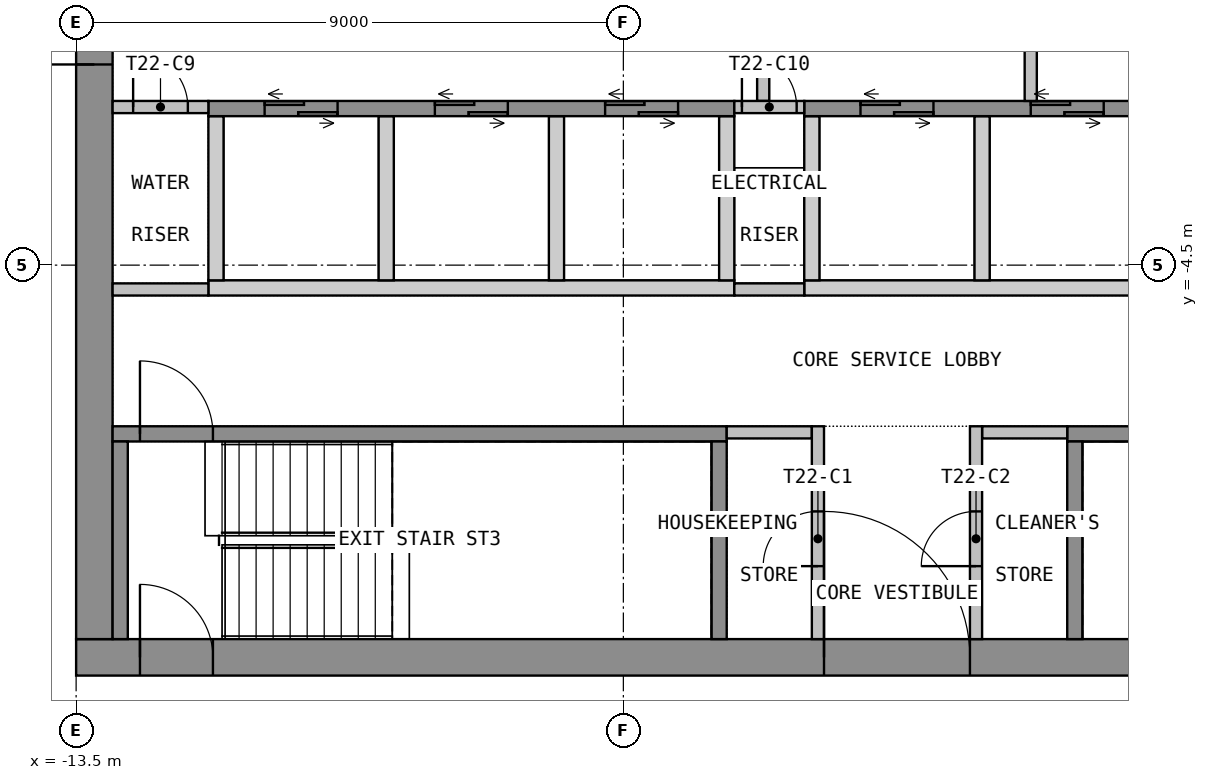
"""IFC4 building model, lengths in metres.
Left out: names, types, materials, properties, quantities, classifications, styles, units other than length and angle.
Written with IfcOpenShell. Run it as: python <this file> out.ifc"""

import sys

from ifc_helpers import new_model, si_unit, direction, frame, frame_2d, origin, place, context, subcontext, project, spatial, polyline, rectangle, outline, extrude, element, fill, save


model = new_model("IFC4")
c1 = context("Model", 3, precision=1e-05, world=origin(), true_north=direction((0.0, 1.0)))
c2 = subcontext(c1, "Body", "Model", "MODEL_VIEW")
j1 = project(units=[si_unit("LENGTHUNIT", "METRE"), si_unit("PLANEANGLEUNIT", "RADIAN")], contexts=[c1])
p1 = place(None, origin())
s1 = spatial("IfcSite", under=j1, at=p1, CompositionType="ELEMENT")
p2 = place(p1, origin())
s2 = spatial("IfcBuilding", under=s1, at=p2, CompositionType="ELEMENT")
p3 = place(p2, frame((0.0, 0.0, 298.2)))
s3 = spatial("IfcBuildingStorey", under=s2, at=p3, CompositionType="ELEMENT", Elevation=298.2)
p4 = place(p3, frame((-13.5, -10.95, 0.0), z_axis=(0.0, 0.0, 1.0), x_axis=(1.0, 0.0, 0.0)))
e1 = element("IfcWall", 1, at=p4, inside=s3, PredefinedType="SHEAR", context=c2, shape_type="SweptSolid", body=[
    extrude(rectangle(XDim=27.0, YDim=0.6, at=frame_2d((13.5, 0.0))), origin(), (0.0, 0.0, 1.0), 3.575),
])
p5 = place(p4, frame((12.3, 0.0, 0.0)))
e2 = element("IfcOpeningElement", 2, at=p5, cuts=e1, PredefinedType="OPENING", context=c2, shape_type="SweptSolid", body=[
    extrude(rectangle(XDim=2.4, YDim=2.1, at=frame_2d((1.2, 1.05))), frame((0.0, 0.31, 0.0), z_axis=(0.0, -1.0, 0.0), x_axis=(1.0, 0.0, 0.0)), (0.0, 0.0, 1.0), 0.62),
])
p6 = place(p4, frame((1.05, 0.0, 0.0)))
e3 = element("IfcOpeningElement", 3, at=p6, cuts=e1, PredefinedType="OPENING", context=c2, shape_type="SweptSolid", body=[
    extrude(rectangle(XDim=1.2, YDim=2.1, at=frame_2d((0.6, 1.05))), frame((0.0, 0.31, 0.0), z_axis=(0.0, -1.0, 0.0), x_axis=(1.0, 0.0, 0.0)), (0.0, 0.0, 1.0), 0.62),
])
p7 = place(p4, frame((24.75, 0.0, 0.0)))
e4 = element("IfcOpeningElement", 4, at=p7, cuts=e1, PredefinedType="OPENING", context=c2, shape_type="SweptSolid", body=[
    extrude(rectangle(XDim=1.2, YDim=2.1, at=frame_2d((0.6, 1.05))), frame((0.0, 0.31, 0.0), z_axis=(0.0, -1.0, 0.0), x_axis=(1.0, 0.0, 0.0)), (0.0, 0.0, 1.0), 0.62),
])
p8 = place(p3, frame((-13.2, -10.65, 0.0), z_axis=(0.0, 0.0, 1.0), x_axis=(0.0, 1.0, 0.0)))
e5 = element("IfcWall", 5, at=p8, inside=s3, PredefinedType="SHEAR", context=c2, shape_type="SweptSolid", body=[
    extrude(rectangle(XDim=21.3, YDim=0.6, at=frame_2d((10.65, 0.0))), origin(), (0.0, 0.0, 1.0), 3.575),
])
p9 = place(p8, frame((9.45, 0.0, 0.0)))
e6 = element("IfcOpeningElement", 6, at=p9, cuts=e5, PredefinedType="OPENING", context=c2, shape_type="SweptSolid", body=[
    extrude(rectangle(XDim=2.4, YDim=2.1, at=frame_2d((1.2, 1.05))), frame((0.0, 0.31, 0.0), z_axis=(0.0, -1.0, 0.0), x_axis=(1.0, 0.0, 0.0)), (0.0, 0.0, 1.0), 0.62),
])
p10 = place(p3, origin())
e7 = element("IfcWall", 7, at=p10, inside=s3, PredefinedType="SHEAR", context=c2, shape_type="SweptSolid", body=[
    extrude(outline(polyline([(-11.325, -5.0), (-2.675, -5.0), (-2.675, -4.75), (-11.325, -4.75), (-11.325, -5.0)])), origin(), (0.0, 0.0, 1.0), 3.575),
])
p11 = place(p3, origin())
e8 = element("IfcWall", 8, at=p11, inside=s3, PredefinedType="SHEAR", context=c2, shape_type="SweptSolid", body=[
    extrude(outline(polyline([(-1.525, -5.0), (4.325, -5.0), (4.325, -4.75), (-1.525, -4.75), (-1.525, -5.0)])), origin(), (0.0, 0.0, 1.0), 3.575),
])
p12 = place(p3, origin())
e9 = element("IfcWall", 9, at=p12, inside=s3, PredefinedType="SHEAR", context=c2, shape_type="SweptSolid", body=[
    extrude(outline(polyline([(-11.325, -4.75), (-11.075, -4.75), (-11.075, -2.05), (-11.325, -2.05), (-11.325, -4.75)])), origin(), (0.0, 0.0, 1.0), 3.575),
])
p13 = place(p3, origin())
e10 = element("IfcWall", 10, at=p13, inside=s3, PredefinedType="SHEAR", context=c2, shape_type="SweptSolid", body=[
    extrude(outline(polyline([(-8.525, -4.75), (-8.275, -4.75), (-8.275, -2.05), (-8.525, -2.05), (-8.525, -4.75)])), origin(), (0.0, 0.0, 1.0), 3.575),
])
p14 = place(p3, origin())
e11 = element("IfcWall", 11, at=p14, inside=s3, PredefinedType="SHEAR", context=c2, shape_type="SweptSolid", body=[
    extrude(outline(polyline([(-5.725, -4.75), (-5.475, -4.75), (-5.475, -2.05), (-5.725, -2.05), (-5.725, -4.75)])), origin(), (0.0, 0.0, 1.0), 3.575),
])
p15 = place(p3, origin())
e12 = element("IfcWall", 12, at=p15, inside=s3, PredefinedType="SHEAR", context=c2, shape_type="SweptSolid", body=[
    extrude(outline(polyline([(-2.925, -4.75), (-2.675, -4.75), (-2.675, -2.05), (-2.925, -2.05), (-2.925, -4.75)])), origin(), (0.0, 0.0, 1.0), 3.575),
])
p16 = place(p3, origin())
e13 = element("IfcWall", 13, at=p16, inside=s3, PredefinedType="SHEAR", context=c2, shape_type="SweptSolid", body=[
    extrude(outline(polyline([(-1.525, -4.75), (-1.275, -4.75), (-1.275, -2.05), (-1.525, -2.05), (-1.525, -4.75)])), origin(), (0.0, 0.0, 1.0), 3.575),
])
p17 = place(p3, origin())
e14 = element("IfcWall", 14, at=p17, inside=s3, PredefinedType="SHEAR", context=c2, shape_type="SweptSolid", body=[
    extrude(outline(polyline([(1.275, -4.75), (1.525, -4.75), (1.525, -2.05), (1.275, -2.05), (1.275, -4.75)])), origin(), (0.0, 0.0, 1.0), 3.575),
])
p18 = place(p3, frame((-11.325, -1.925, 0.0), z_axis=(0.0, 0.0, 1.0), x_axis=(1.0, 0.0, 0.0)))
e15 = element("IfcWall", 15, at=p18, inside=s3, PredefinedType="SHEAR", context=c2, shape_type="SweptSolid", body=[
    extrude(rectangle(XDim=8.65, YDim=0.25, at=frame_2d((4.325, 0.0))), origin(), (0.0, 0.0, 1.0), 3.575),
])
p19 = place(p18, frame((0.925, 0.0, 0.0)))
e16 = element("IfcOpeningElement", 16, at=p19, cuts=e15, PredefinedType="OPENING", context=c2, shape_type="SweptSolid", body=[
    extrude(rectangle(XDim=1.2, YDim=2.1, at=frame_2d((0.6, 1.05))), frame((0.0, 0.135, 0.0), z_axis=(0.0, -1.0, 0.0), x_axis=(1.0, 0.0, 0.0)), (0.0, 0.0, 1.0), 0.27),
])
p20 = place(p18, frame((3.725, 0.0, 0.0)))
e17 = element("IfcOpeningElement", 17, at=p20, cuts=e15, PredefinedType="OPENING", context=c2, shape_type="SweptSolid", body=[
    extrude(rectangle(XDim=1.2, YDim=2.1, at=frame_2d((0.6, 1.05))), frame((0.0, 0.135, 0.0), z_axis=(0.0, -1.0, 0.0), x_axis=(1.0, 0.0, 0.0)), (0.0, 0.0, 1.0), 0.27),
])
p21 = place(p18, frame((6.525, 0.0, 0.0)))
e18 = element("IfcOpeningElement", 18, at=p21, cuts=e15, PredefinedType="OPENING", context=c2, shape_type="SweptSolid", body=[
    extrude(rectangle(XDim=1.2, YDim=2.1, at=frame_2d((0.6, 1.05))), frame((0.0, 0.135, 0.0), z_axis=(0.0, -1.0, 0.0), x_axis=(1.0, 0.0, 0.0)), (0.0, 0.0, 1.0), 0.27),
])
p22 = place(p3, frame((-1.525, -1.925, 0.0), z_axis=(0.0, 0.0, 1.0), x_axis=(1.0, 0.0, 0.0)))
e19 = element("IfcWall", 19, at=p22, inside=s3, PredefinedType="SHEAR", context=c2, shape_type="SweptSolid", body=[
    extrude(rectangle(XDim=5.85, YDim=0.25, at=frame_2d((2.925, 0.0))), origin(), (0.0, 0.0, 1.0), 3.575),
])
p23 = place(p22, frame((0.925, 0.0, 0.0)))
e20 = element("IfcOpeningElement", 20, at=p23, cuts=e19, PredefinedType="OPENING", context=c2, shape_type="SweptSolid", body=[
    extrude(rectangle(XDim=1.2, YDim=2.1, at=frame_2d((0.6, 1.05))), frame((0.0, 0.135, 0.0), z_axis=(0.0, -1.0, 0.0), x_axis=(1.0, 0.0, 0.0)), (0.0, 0.0, 1.0), 0.27),
])
p24 = place(p22, frame((3.725, 0.0, 0.0)))
e21 = element("IfcOpeningElement", 21, at=p24, cuts=e19, PredefinedType="OPENING", context=c2, shape_type="SweptSolid", body=[
    extrude(rectangle(XDim=1.2, YDim=2.1, at=frame_2d((0.6, 1.05))), frame((0.0, 0.135, 0.0), z_axis=(0.0, -1.0, 0.0), x_axis=(1.0, 0.0, 0.0)), (0.0, 0.0, 1.0), 0.27),
])
p25 = place(p3, frame((-2.2, -1.8, 0.0), z_axis=(0.0, 0.0, 1.0), x_axis=(0.0, 1.0, 0.0)))
e22 = element("IfcWall", 22, at=p25, inside=s3, PredefinedType="PARTITIONING", context=c2, shape_type="SweptSolid", body=[
    extrude(rectangle(XDim=3.6, YDim=0.2, at=frame_2d((1.8, 0.0))), origin(), (0.0, 0.0, 1.0), 3.575),
])
p26 = place(p25, frame((1.2, 0.0, 0.0)))
e23 = element("IfcOpeningElement", 23, at=p26, cuts=e22, PredefinedType="OPENING", context=c2, shape_type="SweptSolid", body=[
    extrude(rectangle(XDim=1.2, YDim=2.1, at=frame_2d((0.6, 1.05))), frame((0.0, 0.11, 0.0), z_axis=(0.0, -1.0, 0.0), x_axis=(1.0, 0.0, 0.0)), (0.0, 0.0, 1.0), 0.22),
])
p27 = place(p3, frame((2.2, -1.8, 0.0), z_axis=(0.0, 0.0, 1.0), x_axis=(0.0, 1.0, 0.0)))
e24 = element("IfcWall", 24, at=p27, inside=s3, PredefinedType="PARTITIONING", context=c2, shape_type="SweptSolid", body=[
    extrude(rectangle(XDim=3.6, YDim=0.2, at=frame_2d((1.8, 0.0))), origin(), (0.0, 0.0, 1.0), 3.575),
])
p28 = place(p27, frame((1.2, 0.0, 0.0)))
e25 = element("IfcOpeningElement", 25, at=p28, cuts=e24, PredefinedType="OPENING", context=c2, shape_type="SweptSolid", body=[
    extrude(rectangle(XDim=1.2, YDim=2.1, at=frame_2d((0.6, 1.05))), frame((0.0, 0.11, 0.0), z_axis=(0.0, -1.0, 0.0), x_axis=(1.0, 0.0, 0.0)), (0.0, 0.0, 1.0), 0.22),
])
p29 = place(p3, frame((-12.9, -7.275, 0.0), z_axis=(0.0, 0.0, 1.0), x_axis=(1.0, 0.0, 0.0)))
e26 = element("IfcWall", 26, at=p29, inside=s3, PredefinedType="SHEAR", context=c2, shape_type="SweptSolid", body=[
    extrude(rectangle(XDim=10.1, YDim=0.25, at=frame_2d((5.05, 0.0))), origin(), (0.0, 0.0, 1.0), 3.575),
])
p30 = place(p29, frame((0.45, 0.0, 0.0)))
e27 = element("IfcOpeningElement", 27, at=p30, cuts=e26, PredefinedType="OPENING", context=c2, shape_type="SweptSolid", body=[
    extrude(rectangle(XDim=1.2, YDim=2.1, at=frame_2d((0.6, 1.05))), frame((0.0, 0.135, 0.0), z_axis=(0.0, -1.0, 0.0), x_axis=(1.0, 0.0, 0.0)), (0.0, 0.0, 1.0), 0.27),
])
for number, where, z_axis, x_axis in (
    (28, (-12.775, -10.65, 0.0), (0.0, 0.0, 1.0), (0.0, 1.0, 0.0)),
    (29, (-2.925, -10.65, 0.0), (0.0, 0.0, 1.0), (0.0, 1.0, 0.0)),
):
    element("IfcWall", number, at=place(p3, frame(where, z_axis=z_axis, x_axis=x_axis)), inside=s3, PredefinedType="SHEAR", context=c2, shape_type="SweptSolid", body=[
        extrude(rectangle(XDim=3.25, YDim=0.25, at=frame_2d((1.625, 0.0))), origin(), (0.0, 0.0, 1.0), 3.575),
    ])
p31 = place(p3, frame((2.8, -7.275, 0.0), z_axis=(0.0, 0.0, 1.0), x_axis=(1.0, 0.0, 0.0)))
e30 = element("IfcWall", 30, at=p31, inside=s3, PredefinedType="SHEAR", context=c2, shape_type="SweptSolid", body=[
    extrude(rectangle(XDim=10.1, YDim=0.25, at=frame_2d((5.05, 0.0))), origin(), (0.0, 0.0, 1.0), 3.575),
])
p32 = place(p31, frame((8.45, 0.0, 0.0)))
e31 = element("IfcOpeningElement", 31, at=p32, cuts=e30, PredefinedType="OPENING", context=c2, shape_type="SweptSolid", body=[
    extrude(rectangle(XDim=1.2, YDim=2.1, at=frame_2d((0.6, 1.05))), frame((0.0, 0.135, 0.0), z_axis=(0.0, -1.0, 0.0), x_axis=(1.0, 0.0, 0.0)), (0.0, 0.0, 1.0), 0.27),
])
p33 = place(p3, frame((2.925, -10.65, 0.0), z_axis=(0.0, 0.0, 1.0), x_axis=(0.0, 1.0, 0.0)))
e32 = element("IfcWall", 32, at=p33, inside=s3, PredefinedType="SHEAR", context=c2, shape_type="SweptSolid", body=[
    extrude(rectangle(XDim=3.25, YDim=0.25, at=frame_2d((1.625, 0.0))), origin(), (0.0, 0.0, 1.0), 3.575),
])
for number, where, z_axis, x_axis in (
    (33, (-2.8, -7.25, 0.0), (0.0, 0.0, 1.0), (1.0, 0.0, 0.0)),
    (34, (1.4, -7.25, 0.0), (0.0, 0.0, 1.0), (1.0, 0.0, 0.0)),
):
    element("IfcWall", number, at=place(p3, frame(where, z_axis=z_axis, x_axis=x_axis)), inside=s3, PredefinedType="PARTITIONING", context=c2, shape_type="SweptSolid", body=[
        extrude(rectangle(XDim=1.4, YDim=0.2, at=frame_2d((0.7, 0.0))), origin(), (0.0, 0.0, 1.0), 3.575),
    ])
p34 = place(p3, frame((-1.3, -10.65, 0.0), z_axis=(0.0, 0.0, 1.0), x_axis=(0.0, 1.0, 0.0)))
e35 = element("IfcWall", 35, at=p34, inside=s3, PredefinedType="PARTITIONING", context=c2, shape_type="SweptSolid", body=[
    extrude(rectangle(XDim=3.5, YDim=0.2, at=frame_2d((1.75, 0.0))), origin(), (0.0, 0.0, 1.0), 3.575),
])
p35 = place(p34, frame((1.2, 0.0, 0.0)))
e36 = element("IfcOpeningElement", 36, at=p35, cuts=e35, PredefinedType="OPENING", context=c2, shape_type="SweptSolid", body=[
    extrude(rectangle(XDim=0.9, YDim=2.1, at=frame_2d((0.45, 1.05))), frame((0.0, 0.11, 0.0), z_axis=(0.0, -1.0, 0.0), x_axis=(1.0, 0.0, 0.0)), (0.0, 0.0, 1.0), 0.22),
])
p36 = place(p3, frame((1.3, -10.65, 0.0), z_axis=(0.0, 0.0, 1.0), x_axis=(0.0, 1.0, 0.0)))
e37 = element("IfcWall", 37, at=p36, inside=s3, PredefinedType="PARTITIONING", context=c2, shape_type="SweptSolid", body=[
    extrude(rectangle(XDim=3.5, YDim=0.2, at=frame_2d((1.75, 0.0))), origin(), (0.0, 0.0, 1.0), 3.575),
])
p37 = place(p36, frame((1.2, 0.0, 0.0)))
e38 = element("IfcOpeningElement", 38, at=p37, cuts=e37, PredefinedType="OPENING", context=c2, shape_type="SweptSolid", body=[
    extrude(rectangle(XDim=0.9, YDim=2.1, at=frame_2d((0.45, 1.05))), frame((0.0, 0.11, 0.0), z_axis=(0.0, -1.0, 0.0), x_axis=(1.0, 0.0, 0.0)), (0.0, 0.0, 1.0), 0.22),
])
p38 = place(p3, frame((-12.9, -1.9, 0.0), z_axis=(0.0, 0.0, 1.0), x_axis=(1.0, 0.0, 0.0)))
e39 = element("IfcWall", 39, at=p38, inside=s3, PredefinedType="PARTITIONING", context=c2, shape_type="SweptSolid", body=[
    extrude(rectangle(XDim=1.575, YDim=0.2, at=frame_2d((0.788, 0.0))), origin(), (0.0, 0.0, 1.0), 3.575),
])
p39 = place(p38, frame((0.337, 0.0, 0.0)))
e40 = element("IfcOpeningElement", 40, at=p39, cuts=e39, PredefinedType="OPENING", context=c2, shape_type="SweptSolid", body=[
    extrude(rectangle(XDim=0.9, YDim=2.1, at=frame_2d((0.45, 1.05))), frame((0.0, 0.11, 0.0), z_axis=(0.0, -1.0, 0.0), x_axis=(1.0, 0.0, 0.0)), (0.0, 0.0, 1.0), 0.22),
])
p40 = place(p3, frame((-12.9, -4.9, 0.0), z_axis=(0.0, 0.0, 1.0), x_axis=(1.0, 0.0, 0.0)))
e41 = element("IfcWall", 41, at=p40, inside=s3, PredefinedType="PARTITIONING", context=c2, shape_type="SweptSolid", body=[
    extrude(rectangle(XDim=1.575, YDim=0.2, at=frame_2d((0.788, 0.0))), origin(), (0.0, 0.0, 1.0), 3.575),
])
p41 = place(p3, frame((-2.675, -1.9, 0.0), z_axis=(0.0, 0.0, 1.0), x_axis=(1.0, 0.0, 0.0)))
e42 = element("IfcWall", 42, at=p41, inside=s3, PredefinedType="PARTITIONING", context=c2, shape_type="SweptSolid", body=[
    extrude(rectangle(XDim=1.15, YDim=0.2, at=frame_2d((0.575, 0.0))), origin(), (0.0, 0.0, 1.0), 3.575),
])
p42 = place(p41, frame((0.125, 0.0, 0.0)))
e43 = element("IfcOpeningElement", 43, at=p42, cuts=e42, PredefinedType="OPENING", context=c2, shape_type="SweptSolid", body=[
    extrude(rectangle(XDim=0.9, YDim=2.1, at=frame_2d((0.45, 1.05))), frame((0.0, 0.11, 0.0), z_axis=(0.0, -1.0, 0.0), x_axis=(1.0, 0.0, 0.0)), (0.0, 0.0, 1.0), 0.22),
])
p43 = place(p3, frame((-2.675, -4.9, 0.0), z_axis=(0.0, 0.0, 1.0), x_axis=(1.0, 0.0, 0.0)))
e44 = element("IfcWall", 44, at=p43, inside=s3, PredefinedType="PARTITIONING", context=c2, shape_type="SweptSolid", body=[
    extrude(rectangle(XDim=1.15, YDim=0.2, at=frame_2d((0.575, 0.0))), origin(), (0.0, 0.0, 1.0), 3.575),
])
p44 = place(p9, origin())
e45 = element("IfcDoor", 45, at=p44, inside=s3, OperationType="DOUBLE_DOOR_DOUBLE_SWING", PredefinedType="DOOR", context=c2, shape_type="SweptSolid", body=[
    extrude(rectangle(XDim=2.4, YDim=2.1, at=frame_2d((1.2, 1.05))), frame((0.0, 0.025, 0.0), z_axis=(0.0, -1.0, 0.0), x_axis=(1.0, 0.0, 0.0)), (0.0, 0.0, 1.0), 0.05),
])
fill(e6, e45)
p45 = place(p5, origin())
e46 = element("IfcDoor", 46, at=p45, inside=s3, OperationType="DOUBLE_DOOR_DOUBLE_SWING", PredefinedType="DOOR", context=c2, shape_type="SweptSolid", body=[
    extrude(rectangle(XDim=2.4, YDim=2.1, at=frame_2d((1.2, 1.05))), frame((0.0, 0.025, 0.0), z_axis=(0.0, -1.0, 0.0), x_axis=(1.0, 0.0, 0.0)), (0.0, 0.0, 1.0), 0.05),
])
fill(e2, e46)
p46 = place(p6, origin())
e47 = element("IfcDoor", 47, at=p46, inside=s3, OperationType="SINGLE_SWING_RIGHT", PredefinedType="DOOR", context=c2, shape_type="SweptSolid", body=[
    extrude(rectangle(XDim=1.2, YDim=2.1, at=frame_2d((0.6, 1.05))), frame((0.0, 0.025, 0.0), z_axis=(0.0, -1.0, 0.0), x_axis=(1.0, 0.0, 0.0)), (0.0, 0.0, 1.0), 0.05),
])
fill(e3, e47)
p47 = place(p19, origin())
e48 = element("IfcDoor", 48, at=p47, inside=s3, OperationType="DOUBLE_DOOR_SLIDING", PredefinedType="DOOR", context=c2, shape_type="SweptSolid", body=[
    extrude(rectangle(XDim=1.2, YDim=2.1, at=frame_2d((0.6, 1.05))), frame((0.0, 0.025, 0.0), z_axis=(0.0, -1.0, 0.0), x_axis=(1.0, 0.0, 0.0)), (0.0, 0.0, 1.0), 0.05),
])
fill(e16, e48)
p48 = place(p20, origin())
e49 = element("IfcDoor", 49, at=p48, inside=s3, OperationType="DOUBLE_DOOR_SLIDING", PredefinedType="DOOR", context=c2, shape_type="SweptSolid", body=[
    extrude(rectangle(XDim=1.2, YDim=2.1, at=frame_2d((0.6, 1.05))), frame((0.0, 0.025, 0.0), z_axis=(0.0, -1.0, 0.0), x_axis=(1.0, 0.0, 0.0)), (0.0, 0.0, 1.0), 0.05),
])
fill(e17, e49)
p49 = place(p21, origin())
e50 = element("IfcDoor", 50, at=p49, inside=s3, OperationType="DOUBLE_DOOR_SLIDING", PredefinedType="DOOR", context=c2, shape_type="SweptSolid", body=[
    extrude(rectangle(XDim=1.2, YDim=2.1, at=frame_2d((0.6, 1.05))), frame((0.0, 0.025, 0.0), z_axis=(0.0, -1.0, 0.0), x_axis=(1.0, 0.0, 0.0)), (0.0, 0.0, 1.0), 0.05),
])
fill(e18, e50)
p50 = place(p23, origin())
e51 = element("IfcDoor", 51, at=p50, inside=s3, OperationType="DOUBLE_DOOR_SLIDING", PredefinedType="DOOR", context=c2, shape_type="SweptSolid", body=[
    extrude(rectangle(XDim=1.2, YDim=2.1, at=frame_2d((0.6, 1.05))), frame((0.0, 0.025, 0.0), z_axis=(0.0, -1.0, 0.0), x_axis=(1.0, 0.0, 0.0)), (0.0, 0.0, 1.0), 0.05),
])
fill(e20, e51)
p51 = place(p24, origin())
e52 = element("IfcDoor", 52, at=p51, inside=s3, OperationType="DOUBLE_DOOR_SLIDING", PredefinedType="DOOR", context=c2, shape_type="SweptSolid", body=[
    extrude(rectangle(XDim=1.2, YDim=2.1, at=frame_2d((0.6, 1.05))), frame((0.0, 0.025, 0.0), z_axis=(0.0, -1.0, 0.0), x_axis=(1.0, 0.0, 0.0)), (0.0, 0.0, 1.0), 0.05),
])
fill(e21, e52)
p52 = place(p30, origin())
e53 = element("IfcDoor", 53, at=p52, inside=s3, OperationType="SINGLE_SWING_LEFT", PredefinedType="DOOR", context=c2, shape_type="SweptSolid", body=[
    extrude(rectangle(XDim=1.2, YDim=2.1, at=frame_2d((0.6, 1.05))), frame((0.0, 0.025, 0.0), z_axis=(0.0, -1.0, 0.0), x_axis=(1.0, 0.0, 0.0)), (0.0, 0.0, 1.0), 0.05),
])
fill(e27, e53)
p53 = place(p35, origin())
e54 = element("IfcDoor", 54, at=p53, inside=s3, OperationType="SINGLE_SWING_LEFT", PredefinedType="DOOR", context=c2, shape_type="SweptSolid", body=[
    extrude(rectangle(XDim=0.9, YDim=2.1, at=frame_2d((0.45, 1.05))), frame((0.0, 0.025, 0.0), z_axis=(0.0, -1.0, 0.0), x_axis=(1.0, 0.0, 0.0)), (0.0, 0.0, 1.0), 0.05),
])
fill(e36, e54)
p54 = place(p37, origin())
e55 = element("IfcDoor", 55, at=p54, inside=s3, OperationType="SINGLE_SWING_LEFT", PredefinedType="DOOR", context=c2, shape_type="SweptSolid", body=[
    extrude(rectangle(XDim=0.9, YDim=2.1, at=frame_2d((0.45, 1.05))), frame((0.0, 0.025, 0.0), z_axis=(0.0, -1.0, 0.0), x_axis=(1.0, 0.0, 0.0)), (0.0, 0.0, 1.0), 0.05),
])
fill(e38, e55)
p55 = place(p39, origin())
e56 = element("IfcDoor", 56, at=p55, inside=s3, OperationType="SINGLE_SWING_LEFT", PredefinedType="DOOR", context=c2, shape_type="SweptSolid", body=[
    extrude(rectangle(XDim=0.9, YDim=2.1, at=frame_2d((0.45, 1.05))), frame((0.0, 0.025, 0.0), z_axis=(0.0, -1.0, 0.0), x_axis=(1.0, 0.0, 0.0)), (0.0, 0.0, 1.0), 0.05),
])
fill(e40, e56)
p56 = place(p42, origin())
e57 = element("IfcDoor", 57, at=p56, inside=s3, OperationType="SINGLE_SWING_LEFT", PredefinedType="DOOR", context=c2, shape_type="SweptSolid", body=[
    extrude(rectangle(XDim=0.9, YDim=2.1, at=frame_2d((0.45, 1.05))), frame((0.0, 0.025, 0.0), z_axis=(0.0, -1.0, 0.0), x_axis=(1.0, 0.0, 0.0)), (0.0, 0.0, 1.0), 0.05),
])
fill(e43, e57)
save(model, sys.argv[1])
